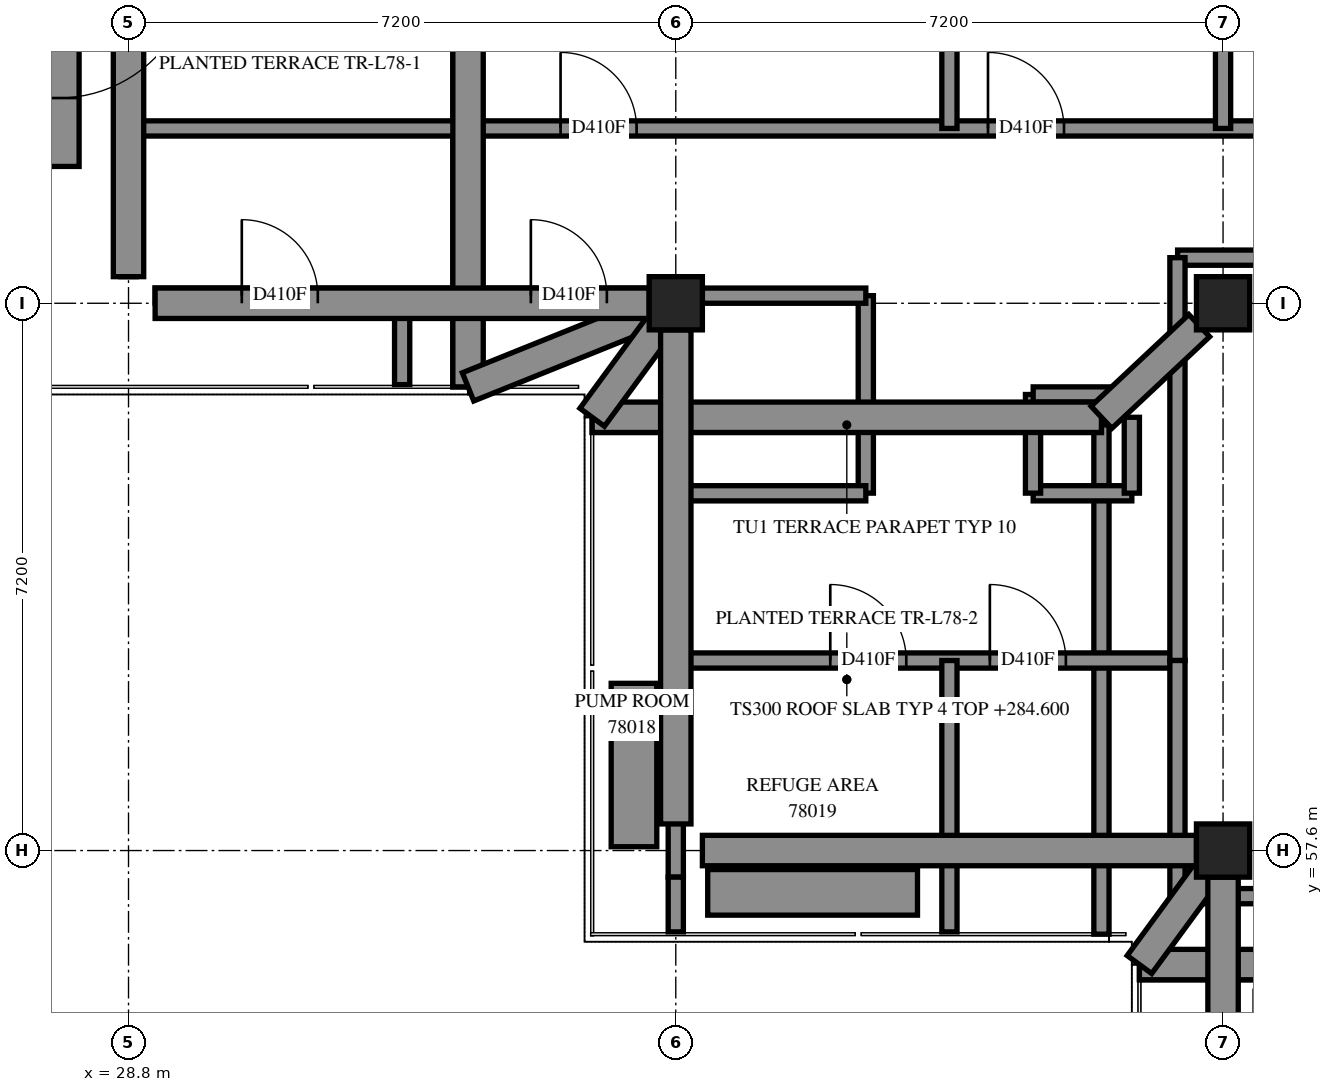
"""IFC4 building model, lengths in metres.
Left out: names, types, materials, properties, quantities, classifications, styles, units other than length and angle.
Written with IfcOpenShell. Run it as: python <this file> out.ifc"""

import sys

from ifc_helpers import new_model, si_unit, direction, frame, frame_2d, origin, origin_2d, place, context, subcontext, project, spatial, polyline, rectangle, outline, extrude, element, fill, save


model = new_model("IFC4")
c1 = context("Model", 3, precision=1e-05, world=origin(), true_north=direction((0.0, 1.0)))
c2 = subcontext(c1, "Body", "Model", "MODEL_VIEW")
j1 = project(units=[si_unit("LENGTHUNIT", "METRE"), si_unit("PLANEANGLEUNIT", "RADIAN")], contexts=[c1])
p1 = place(None, origin())
s1 = spatial("IfcSite", under=j1, at=p1, CompositionType="ELEMENT")
p2 = place(p1, origin())
s2 = spatial("IfcBuilding", under=s1, at=p2, CompositionType="ELEMENT")
p3 = place(p2, frame((0.0, 0.0, 284.6)))
s3 = spatial("IfcBuildingStorey", under=s2, at=p3, CompositionType="ELEMENT", Elevation=284.6)
for number, where, z_axis, x_axis in (
    (1, (36.0, 64.8, 0.0), (0.0, 0.0, 1.0), (1.0, 0.0, 0.0)),
    (2, (43.2, 57.6, 0.0), (0.0, 0.0, 1.0), (1.0, 0.0, 0.0)),
    (3, (43.2, 64.8, 0.0), (0.0, 0.0, 1.0), (1.0, 0.0, 0.0)),
):
    element("IfcColumn", number, at=place(p3, frame(where, z_axis=z_axis, x_axis=x_axis)), inside=s3, PredefinedType="COLUMN", context=c2, shape_type="SweptSolid", body=[
        extrude(rectangle(XDim=0.7, YDim=0.7, at=origin_2d()), origin(), (0.0, 0.0, 1.0), 5.7),
    ])
p4 = place(p3, frame((27.875, 70.2, 0.0), z_axis=(0.0, 0.0, 1.0), x_axis=(0.0, -1.0, 0.0)))
e4 = element("IfcWall", 4, at=p4, inside=s3, PredefinedType="SOLIDWALL", context=c2, shape_type="SweptSolid", body=[
    extrude(rectangle(XDim=3.6, YDim=0.55, at=frame_2d((1.8, 0.0))), origin(), (0.0, 0.0, 1.0), 5.7),
])
p5 = place(p4, frame((0.9, 0.0, 0.0)))
e5 = element("IfcOpeningElement", 5, at=p5, cuts=e4, PredefinedType="OPENING", context=c2, shape_type="SweptSolid", body=[
    extrude(rectangle(XDim=1.8, YDim=2.4, at=frame_2d((0.9, 1.2))), frame((0.0, 0.285, 0.0), z_axis=(0.0, -1.0, 0.0), x_axis=(1.0, 0.0, 0.0)), (0.0, 0.0, 1.0), 0.57),
])
p6 = place(p3, frame((33.167, 63.7, 0.0), z_axis=(0.0, 0.0, 1.0), x_axis=(0.0, 1.0, 0.0)))
e6 = element("IfcWall", 6, at=p6, inside=s3, PredefinedType="PARAPET", context=c2, shape_type="SweptSolid", body=[
    extrude(outline(polyline([(0.0, -0.1), (9.4, -0.1), (9.4, 0.1), (0.0, 0.1), (0.0, -0.1)])), origin(), (0.0, 0.0, 1.0), 0.25),
])
p7 = place(p3, frame((41.6, 56.5, 0.0), z_axis=(0.0, 0.0, 1.0), x_axis=(0.0, 1.0, 0.0)))
e7 = element("IfcWall", 7, at=p7, inside=s3, PredefinedType="PARAPET", context=c2, shape_type="SweptSolid", body=[
    extrude(outline(polyline([(0.0, -0.1), (6.8, -0.1), (6.6, 0.1), (0.0, 0.1), (0.0, -0.1)])), origin(), (0.0, 0.0, 1.0), 0.25),
])
p8 = place(p3, frame((41.6, 63.2, 0.0), z_axis=(0.0, 0.0, 1.0), x_axis=(-1.0, 0.0, 0.0)))
e8 = element("IfcWall", 8, at=p8, inside=s3, PredefinedType="PARAPET", context=c2, shape_type="SweptSolid", body=[
    extrude(outline(polyline([(-0.1, -0.1), (6.7, -0.1), (6.7, 0.1), (0.1, 0.1), (-0.1, -0.1)])), origin(), (0.0, 0.0, 1.0), 0.25),
])
p9 = place(p3, frame((35.45, 59.8, 0.0), z_axis=(0.0, 0.0, 1.0), x_axis=(0.0, -1.0, 0.0)))
e9 = element("IfcWall", 9, at=p9, inside=s3, PredefinedType="SOLIDWALL", context=c2, shape_type="SweptSolid", body=[
    extrude(rectangle(XDim=2.15, YDim=0.6, at=frame_2d((1.075, 0.0))), origin(), (0.0, 0.0, 1.0), 0.65),
])
p10 = place(p3, frame((36.42, 57.05, 0.0), z_axis=(0.0, 0.0, 1.0), x_axis=(1.0, 0.0, 0.0)))
e10 = element("IfcWall", 10, at=p10, inside=s3, PredefinedType="SOLIDWALL", context=c2, shape_type="SweptSolid", body=[
    extrude(rectangle(XDim=2.76, YDim=0.6, at=frame_2d((1.38, 0.0))), origin(), (0.0, 0.0, 1.0), 0.65),
])
p11 = place(p3, frame((28.8, 67.1, 0.0), z_axis=(0.0, 0.0, 1.0), x_axis=(1.0, 0.0, 0.0)))
e11 = element("IfcWall", 11, at=p11, inside=s3, PredefinedType="PARTITIONING", context=c2, shape_type="SweptSolid", body=[
    extrude(rectangle(XDim=23.7, YDim=0.2, at=frame_2d((11.85, 0.0))), origin(), (0.0, 0.0, 1.0), 5.7),
])
p12 = place(p11, frame((5.684, 0.0, 0.0)))
e12 = element("IfcOpeningElement", 12, at=p12, cuts=e11, PredefinedType="OPENING", context=c2, shape_type="SweptSolid", body=[
    extrude(rectangle(XDim=1.0, YDim=2.1, at=frame_2d((0.5, 1.05))), frame((0.0, 0.11, 0.0), z_axis=(0.0, -1.0, 0.0), x_axis=(1.0, 0.0, 0.0)), (0.0, 0.0, 1.0), 0.22),
])
p13 = place(p11, frame((11.307, 0.0, 0.0)))
e13 = element("IfcOpeningElement", 13, at=p13, cuts=e11, PredefinedType="OPENING", context=c2, shape_type="SweptSolid", body=[
    extrude(rectangle(XDim=1.0, YDim=2.1, at=frame_2d((0.5, 1.05))), frame((0.0, 0.11, 0.0), z_axis=(0.0, -1.0, 0.0), x_axis=(1.0, 0.0, 0.0)), (0.0, 0.0, 1.0), 0.22),
])
p14 = place(p11, frame((18.262, 0.0, 0.0)))
e14 = element("IfcOpeningElement", 14, at=p14, cuts=e11, PredefinedType="OPENING", context=c2, shape_type="SweptSolid", body=[
    extrude(rectangle(XDim=1.0, YDim=2.1, at=frame_2d((0.5, 1.05))), frame((0.0, 0.11, 0.0), z_axis=(0.0, -1.0, 0.0), x_axis=(1.0, 0.0, 0.0)), (0.0, 0.0, 1.0), 0.22),
])
p15 = place(p3, frame((42.6, 57.0, 0.0), z_axis=(0.0, 0.0, 1.0), x_axis=(1.0, 0.0, 0.0)))
e15 = element("IfcWall", 15, at=p15, inside=s3, PredefinedType="PARTITIONING", context=c2, shape_type="SweptSolid", body=[
    extrude(rectangle(XDim=8.4, YDim=0.2, at=frame_2d((4.2, 0.0))), origin(), (0.0, 0.0, 1.0), 5.2),
])
p16 = place(p15, frame((1.9, 0.0, 0.0)))
e16 = element("IfcOpeningElement", 16, at=p16, cuts=e15, PredefinedType="OPENING", context=c2, shape_type="SweptSolid", body=[
    extrude(rectangle(XDim=1.0, YDim=2.1, at=frame_2d((0.5, 1.05))), frame((0.0, 0.11, 0.0), z_axis=(0.0, -1.0, 0.0), x_axis=(1.0, 0.0, 0.0)), (0.0, 0.0, 1.0), 0.22),
])
p17 = place(p3, frame((42.602, 65.4, 0.0), z_axis=(0.0, 0.0, 1.0), x_axis=(1.0, 0.0, 0.0)))
e17 = element("IfcWall", 17, at=p17, inside=s3, PredefinedType="PARTITIONING", context=c2, shape_type="SweptSolid", body=[
    extrude(rectangle(XDim=8.398, YDim=0.2, at=frame_2d((4.199, 0.0))), origin(), (0.0, 0.0, 1.0), 5.7),
])
p18 = place(p17, frame((4.526, 0.0, 0.0)))
e18 = element("IfcOpeningElement", 18, at=p18, cuts=e17, PredefinedType="OPENING", context=c2, shape_type="SweptSolid", body=[
    extrude(rectangle(XDim=1.0, YDim=2.1, at=frame_2d((0.5, 1.05))), frame((0.0, 0.11, 0.0), z_axis=(0.0, -1.0, 0.0), x_axis=(1.0, 0.0, 0.0)), (0.0, 0.0, 1.0), 0.22),
])
p19 = place(p3, frame((36.0, 60.1, 0.0), z_axis=(0.0, 0.0, 1.0), x_axis=(1.0, 0.0, 0.0)))
e19 = element("IfcWall", 19, at=p19, inside=s3, PredefinedType="PARTITIONING", context=c2, shape_type="SweptSolid", body=[
    extrude(rectangle(XDim=6.6, YDim=0.2, at=frame_2d((3.3, 0.0))), origin(), (0.0, 0.0, 1.0), 5.7),
])
p20 = place(p19, frame((2.033, 0.0, 0.0)))
e20 = element("IfcOpeningElement", 20, at=p20, cuts=e19, PredefinedType="OPENING", context=c2, shape_type="SweptSolid", body=[
    extrude(rectangle(XDim=1.0, YDim=2.1, at=frame_2d((0.5, 1.05))), frame((0.0, 0.11, 0.0), z_axis=(0.0, -1.0, 0.0), x_axis=(1.0, 0.0, 0.0)), (0.0, 0.0, 1.0), 0.22),
])
p21 = place(p19, frame((4.132, 0.0, 0.0)))
e21 = element("IfcOpeningElement", 21, at=p21, cuts=e19, PredefinedType="OPENING", context=c2, shape_type="SweptSolid", body=[
    extrude(rectangle(XDim=1.0, YDim=2.1, at=frame_2d((0.5, 1.05))), frame((0.0, 0.11, 0.0), z_axis=(0.0, -1.0, 0.0), x_axis=(1.0, 0.0, 0.0)), (0.0, 0.0, 1.0), 0.22),
])
p22 = place(p3, frame((29.15, 64.9, 0.0), z_axis=(0.0, 0.0, 1.0), x_axis=(1.0, 0.0, 0.0)))
e22 = element("IfcWall", 22, at=p22, inside=s3, PredefinedType="PARTITIONING", context=c2, shape_type="SweptSolid", body=[
    extrude(rectangle(XDim=7.2, YDim=0.2, at=frame_2d((3.6, 0.0))), origin(), (0.0, 0.0, 1.0), 5.7),
])
p23 = place(p22, frame((1.14, 0.0, 0.0)))
e23 = element("IfcOpeningElement", 23, at=p23, cuts=e22, PredefinedType="OPENING", context=c2, shape_type="SweptSolid", body=[
    extrude(rectangle(XDim=1.0, YDim=2.1, at=frame_2d((0.5, 1.05))), frame((0.0, 0.11, 0.0), z_axis=(0.0, -1.0, 0.0), x_axis=(1.0, 0.0, 0.0)), (0.0, 0.0, 1.0), 0.22),
])
p24 = place(p22, frame((4.943, 0.0, 0.0)))
e24 = element("IfcOpeningElement", 24, at=p24, cuts=e22, PredefinedType="OPENING", context=c2, shape_type="SweptSolid", body=[
    extrude(rectangle(XDim=1.0, YDim=2.1, at=frame_2d((0.5, 1.05))), frame((0.0, 0.11, 0.0), z_axis=(0.0, -1.0, 0.0), x_axis=(1.0, 0.0, 0.0)), (0.0, 0.0, 1.0), 0.22),
])
p25 = place(p3, frame((43.2, 50.05, 0.0), z_axis=(0.0, 0.0, 1.0), x_axis=(0.0, 1.0, 0.0)))
e25 = element("IfcWall", 25, at=p25, inside=s3, PredefinedType="PARTITIONING", context=c2, shape_type="SweptSolid", body=[
    extrude(rectangle(XDim=6.95, YDim=0.2, at=frame_2d((3.475, 0.0))), origin(), (0.0, 0.0, 1.0), 5.7),
])
p26 = place(p25, frame((2.575, 0.0, 0.0)))
e26 = element("IfcOpeningElement", 26, at=p26, cuts=e25, PredefinedType="OPENING", context=c2, shape_type="SweptSolid", body=[
    extrude(rectangle(XDim=1.0, YDim=2.1, at=frame_2d((0.5, 1.05))), frame((0.0, 0.11, 0.0), z_axis=(0.0, -1.0, 0.0), x_axis=(1.0, 0.0, 0.0)), (0.0, 0.0, 1.0), 0.22),
])
p27 = place(p3, frame((39.6, 67.1, 0.0), z_axis=(0.0, 0.0, 1.0), x_axis=(0.0, 1.0, 0.0)))
e27 = element("IfcWall", 27, at=p27, inside=s3, PredefinedType="PARTITIONING", context=c2, shape_type="SweptSolid", body=[
    extrude(rectangle(XDim=5.9, YDim=0.2, at=frame_2d((2.95, 0.0))), origin(), (0.0, 0.0, 1.0), 5.7),
])
p28 = place(p3, frame((42.6, 60.1, 0.0), z_axis=(0.0, 0.0, 1.0), x_axis=(0.0, 1.0, 0.0)))
e28 = element("IfcWall", 28, at=p28, inside=s3, PredefinedType="PARTITIONING", context=c2, shape_type="SweptSolid", body=[
    extrude(rectangle(XDim=5.3, YDim=0.2, at=frame_2d((2.65, 0.0))), origin(), (0.0, 0.0, 1.0), 5.2),
])
p29 = place(p3, frame((28.8, 67.1, 0.0), z_axis=(0.0, 0.0, 1.0), x_axis=(0.0, 1.0, 0.0)))
e29 = element("IfcWall", 29, at=p29, inside=s3, PredefinedType="PARTITIONING", context=c2, shape_type="SweptSolid", body=[
    extrude(rectangle(XDim=5.25, YDim=0.2, at=frame_2d((2.625, 0.0))), origin(), (0.0, 0.0, 1.0), 5.7),
])
p30 = place(p3, frame((43.2, 67.1, 0.0), z_axis=(0.0, 0.0, 1.0), x_axis=(0.0, 1.0, 0.0)))
e30 = element("IfcWall", 30, at=p30, inside=s3, PredefinedType="PARTITIONING", context=c2, shape_type="SweptSolid", body=[
    extrude(rectangle(XDim=5.25, YDim=0.2, at=frame_2d((2.625, 0.0))), origin(), (0.0, 0.0, 1.0), 5.7),
])
p31 = place(p30, frame((2.37, 0.0, 0.0)))
e31 = element("IfcOpeningElement", 31, at=p31, cuts=e30, PredefinedType="OPENING", context=c2, shape_type="SweptSolid", body=[
    extrude(rectangle(XDim=1.0, YDim=2.1, at=frame_2d((0.5, 1.05))), frame((0.0, 0.11, 0.0), z_axis=(0.0, -1.0, 0.0), x_axis=(1.0, 0.0, 0.0)), (0.0, 0.0, 1.0), 0.22),
])
p32 = place(p3, frame((39.6, 56.53, 0.0), z_axis=(0.0, 0.0, 1.0), x_axis=(0.0, 1.0, 0.0)))
e32 = element("IfcWall", 32, at=p32, inside=s3, PredefinedType="PARTITIONING", context=c2, shape_type="SweptSolid", body=[
    extrude(rectangle(XDim=3.57, YDim=0.2, at=frame_2d((1.785, 0.0))), origin(), (0.0, 0.0, 1.0), 5.7),
])
p33 = place(p3, frame((42.6, 57.0, 0.0), z_axis=(0.0, 0.0, 1.0), x_axis=(0.0, 1.0, 0.0)))
e33 = element("IfcWall", 33, at=p33, inside=s3, PredefinedType="PARTITIONING", context=c2, shape_type="SweptSolid", body=[
    extrude(rectangle(XDim=3.1, YDim=0.2, at=frame_2d((1.55, 0.0))), origin(), (0.0, 0.0, 1.0), 5.7),
])
p34 = place(p3, frame((38.5, 62.302, 0.0), z_axis=(0.0, 0.0, 1.0), x_axis=(0.0, 1.0, 0.0)))
e34 = element("IfcWall", 34, at=p34, inside=s3, PredefinedType="PARTITIONING", context=c2, shape_type="SweptSolid", body=[
    extrude(rectangle(XDim=2.598, YDim=0.2, at=frame_2d((1.299, 0.0))), origin(), (0.0, 0.0, 1.0), 5.7),
])
p35 = place(p3, frame((36.002, 62.3, 0.0), z_axis=(0.0, 0.0, 1.0), x_axis=(1.0, 0.0, 0.0)))
e35 = element("IfcWall", 35, at=p35, inside=s3, PredefinedType="PARTITIONING", context=c2, shape_type="SweptSolid", body=[
    extrude(rectangle(XDim=2.498, YDim=0.2, at=frame_2d((1.249, 0.0))), origin(), (0.0, 0.0, 1.0), 5.7),
])
p36 = place(p3, frame((36.0, 60.1, 0.0), z_axis=(0.0, 0.0, 1.0), x_axis=(0.0, 1.0, 0.0)))
e36 = element("IfcWall", 36, at=p36, inside=s3, PredefinedType="PARTITIONING", context=c2, shape_type="SweptSolid", body=[
    extrude(rectangle(XDim=2.2, YDim=0.2, at=frame_2d((1.1, 0.0))), origin(), (0.0, 0.0, 1.0), 5.7),
])
p37 = place(p3, frame((36.35, 64.9, 0.0), z_axis=(0.0, 0.0, 1.0), x_axis=(1.0, 0.0, 0.0)))
e37 = element("IfcWall", 37, at=p37, inside=s3, PredefinedType="PARTITIONING", context=c2, shape_type="SweptSolid", body=[
    extrude(rectangle(XDim=2.15, YDim=0.2, at=frame_2d((1.075, 0.0))), origin(), (0.0, 0.0, 1.0), 5.2),
])
p38 = place(p3, frame((36.0, 57.25, 0.0), z_axis=(0.0, 0.0, 1.0), x_axis=(0.0, 1.0, 0.0)))
e38 = element("IfcWall", 38, at=p38, inside=s3, PredefinedType="PARTITIONING", context=c2, shape_type="SweptSolid", body=[
    extrude(rectangle(XDim=2.85, YDim=0.2, at=frame_2d((1.425, 0.0))), origin(), (0.0, 0.0, 1.0), 5.7),
])
p39 = place(p3, frame((28.8, 65.15, 0.0), z_axis=(0.0, 0.0, 1.0), x_axis=(0.0, 1.0, 0.0)))
e39 = element("IfcWall", 39, at=p39, inside=s3, PredefinedType="PARTITIONING", context=c2, shape_type="SweptSolid", body=[
    extrude(rectangle(XDim=1.95, YDim=0.2, at=frame_2d((0.975, 0.0))), origin(), (0.0, 0.0, 1.0), 5.7),
])
p40 = place(p3, frame((40.702, 62.3, 0.0), z_axis=(0.0, 0.0, 1.0), x_axis=(1.0, 0.0, 0.0)))
e40 = element("IfcWall", 40, at=p40, inside=s3, PredefinedType="PARTITIONING", context=c2, shape_type="SweptSolid", body=[
    extrude(rectangle(XDim=1.298, YDim=0.2, at=frame_2d((0.649, 0.0))), origin(), (0.0, 0.0, 1.0), 5.7),
])
p41 = place(p3, frame((40.7, 62.302, 0.0), z_axis=(0.0, 0.0, 1.0), x_axis=(0.0, 1.0, 0.0)))
e41 = element("IfcWall", 41, at=p41, inside=s3, PredefinedType="PARTITIONING", context=c2, shape_type="SweptSolid", body=[
    extrude(rectangle(XDim=1.298, YDim=0.2, at=frame_2d((0.649, 0.0))), origin(), (0.0, 0.0, 1.0), 5.2),
])
p42 = place(p3, frame((32.4, 63.73, 0.0), z_axis=(0.0, 0.0, 1.0), x_axis=(0.0, 1.0, 0.0)))
e42 = element("IfcWall", 42, at=p42, inside=s3, PredefinedType="PARTITIONING", context=c2, shape_type="SweptSolid", body=[
    extrude(rectangle(XDim=1.17, YDim=0.2, at=frame_2d((0.585, 0.0))), origin(), (0.0, 0.0, 1.0), 5.7),
])
p43 = place(p3, frame((40.702, 63.6, 0.0), z_axis=(0.0, 0.0, 1.0), x_axis=(1.0, 0.0, 0.0)))
e43 = element("IfcWall", 43, at=p43, inside=s3, PredefinedType="PARTITIONING", context=c2, shape_type="SweptSolid", body=[
    extrude(rectangle(XDim=0.998, YDim=0.2, at=frame_2d((0.499, 0.0))), origin(), (0.0, 0.0, 1.0), 5.2),
])
p44 = place(p3, frame((42.0, 62.302, 0.0), z_axis=(0.0, 0.0, 1.0), x_axis=(0.0, 1.0, 0.0)))
e44 = element("IfcWall", 44, at=p44, inside=s3, PredefinedType="PARTITIONING", context=c2, shape_type="SweptSolid", body=[
    extrude(rectangle(XDim=0.998, YDim=0.2, at=frame_2d((0.499, 0.0))), origin(), (0.0, 0.0, 1.0), 5.7),
])
p45 = place(p3, frame((36.0, 56.53, 0.0), z_axis=(0.0, 0.0, 1.0), x_axis=(0.0, 1.0, 0.0)))
e45 = element("IfcWall", 45, at=p45, inside=s3, PredefinedType="PARTITIONING", context=c2, shape_type="SweptSolid", body=[
    extrude(rectangle(XDim=0.72, YDim=0.2, at=frame_2d((0.36, 0.0))), origin(), (0.0, 0.0, 1.0), 5.7),
])
p46 = place(p3, frame((44.23, 56.0, 0.0), z_axis=(0.0, 0.0, 1.0), x_axis=(-1.0, 0.0, 0.0)))
e46 = element("IfcWall", 46, at=p46, inside=s3, PredefinedType="PARAPET", context=c2, shape_type="SweptSolid", body=[
    extrude(outline(polyline([(0.0, -0.1), (2.13, -0.1), (2.13, 0.1), (0.0, 0.1), (0.0, -0.1)])), origin(), (0.0, 0.0, 1.0), 0.25),
])
p47 = place(p5, origin())
e47 = element("IfcDoor", 47, at=p47, inside=s3, OperationType="SINGLE_SWING_LEFT", PredefinedType="DOOR", context=c2, shape_type="SweptSolid", body=[
    extrude(rectangle(XDim=1.8, YDim=2.4, at=frame_2d((0.9, 1.2))), frame((0.0, 0.025, 0.0), z_axis=(0.0, -1.0, 0.0), x_axis=(1.0, 0.0, 0.0)), (0.0, 0.0, 1.0), 0.05),
])
fill(e5, e47)
p48 = place(p23, origin())
e48 = element("IfcDoor", 48, at=p48, inside=s3, OperationType="SINGLE_SWING_RIGHT", PredefinedType="DOOR", context=c2, shape_type="SweptSolid", body=[
    extrude(rectangle(XDim=1.0, YDim=2.1, at=frame_2d((0.5, 1.05))), frame((0.0, 0.025, 0.0), z_axis=(0.0, -1.0, 0.0), x_axis=(1.0, 0.0, 0.0)), (0.0, 0.0, 1.0), 0.05),
])
fill(e23, e48)
p49 = place(p12, origin())
e49 = element("IfcDoor", 49, at=p49, inside=s3, OperationType="SINGLE_SWING_RIGHT", PredefinedType="DOOR", context=c2, shape_type="SweptSolid", body=[
    extrude(rectangle(XDim=1.0, YDim=2.1, at=frame_2d((0.5, 1.05))), frame((0.0, 0.025, 0.0), z_axis=(0.0, -1.0, 0.0), x_axis=(1.0, 0.0, 0.0)), (0.0, 0.0, 1.0), 0.05),
])
fill(e12, e49)
p50 = place(p24, origin())
e50 = element("IfcDoor", 50, at=p50, inside=s3, OperationType="SINGLE_SWING_RIGHT", PredefinedType="DOOR", context=c2, shape_type="SweptSolid", body=[
    extrude(rectangle(XDim=1.0, YDim=2.1, at=frame_2d((0.5, 1.05))), frame((0.0, 0.025, 0.0), z_axis=(0.0, -1.0, 0.0), x_axis=(1.0, 0.0, 0.0)), (0.0, 0.0, 1.0), 0.05),
])
fill(e24, e50)
p51 = place(p20, origin())
e51 = element("IfcDoor", 51, at=p51, inside=s3, OperationType="SINGLE_SWING_LEFT", PredefinedType="DOOR", context=c2, shape_type="SweptSolid", body=[
    extrude(rectangle(XDim=1.0, YDim=2.1, at=frame_2d((0.5, 1.05))), frame((0.0, 0.025, 0.0), z_axis=(0.0, -1.0, 0.0), x_axis=(1.0, 0.0, 0.0)), (0.0, 0.0, 1.0), 0.05),
])
fill(e20, e51)
p52 = place(p13, origin())
e52 = element("IfcDoor", 52, at=p52, inside=s3, OperationType="SINGLE_SWING_LEFT", PredefinedType="DOOR", context=c2, shape_type="SweptSolid", body=[
    extrude(rectangle(XDim=1.0, YDim=2.1, at=frame_2d((0.5, 1.05))), frame((0.0, 0.025, 0.0), z_axis=(0.0, -1.0, 0.0), x_axis=(1.0, 0.0, 0.0)), (0.0, 0.0, 1.0), 0.05),
])
fill(e13, e52)
p53 = place(p21, origin())
e53 = element("IfcDoor", 53, at=p53, inside=s3, OperationType="SINGLE_SWING_RIGHT", PredefinedType="DOOR", context=c2, shape_type="SweptSolid", body=[
    extrude(rectangle(XDim=1.0, YDim=2.1, at=frame_2d((0.5, 1.05))), frame((0.0, 0.025, 0.0), z_axis=(0.0, -1.0, 0.0), x_axis=(1.0, 0.0, 0.0)), (0.0, 0.0, 1.0), 0.05),
])
fill(e21, e53)
save(model, sys.argv[1])
